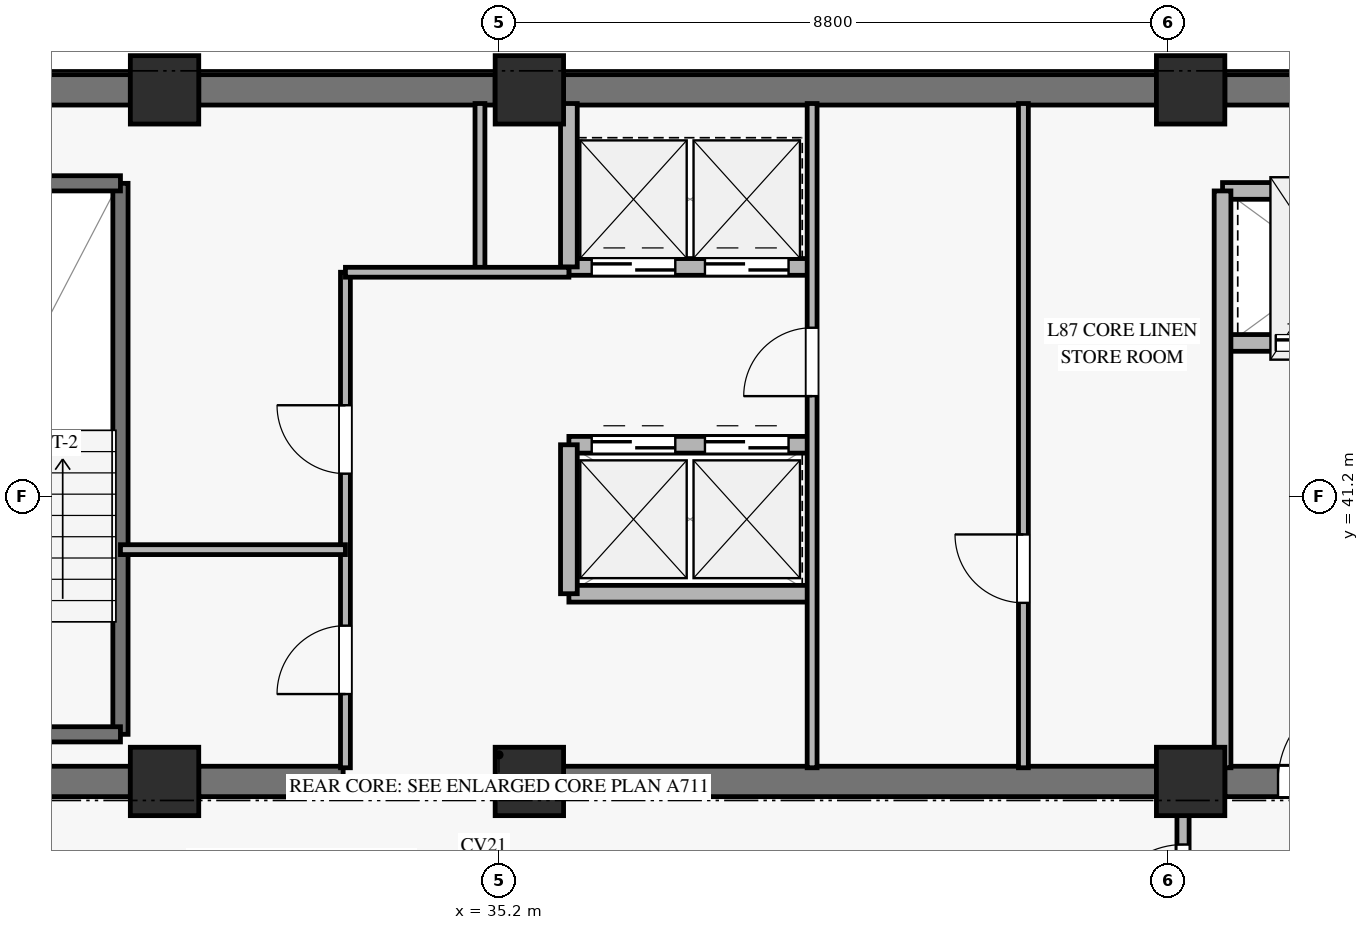
"""IFC4 building model, lengths in metres.
Left out: names, types, materials, properties, quantities, classifications, styles, units other than length and angle.
Written with IfcOpenShell. Run it as: python <this file> out.ifc"""

import sys

from ifc_helpers import new_model, si_unit, direction, frame, frame_2d, origin, origin_2d, place, context, subcontext, project, spatial, rectangle, extrude, source, transform, mapped, element, fill, save


model = new_model("IFC4")
c1 = context("Model", 3, precision=1e-05, world=origin(), true_north=direction((0.0, 1.0)))
c2 = subcontext(c1, "Body", "Model", "MODEL_VIEW")
j1 = project(units=[si_unit("LENGTHUNIT", "METRE"), si_unit("PLANEANGLEUNIT", "RADIAN")], contexts=[c1])
p1 = place(None, origin())
s1 = spatial("IfcSite", under=j1, at=p1, CompositionType="ELEMENT")
p2 = place(p1, origin())
s2 = spatial("IfcBuilding", under=s1, at=p2, CompositionType="ELEMENT")
p3 = place(p2, frame((0.0, 0.0, 335.7)))
s3 = spatial("IfcBuildingStorey", under=s2, at=p3, CompositionType="ELEMENT", Elevation=335.7)
m1 = source(origin(), c2, "Body", "SweptSolid", [
    extrude(rectangle(XDim=0.9, YDim=0.9, at=origin_2d()), origin(), (0.0, 0.0, 1.0), 3.185),
])
for number, where, z_axis, x_axis in (
    (1, (30.8, 37.45, 0.0), (0.0, 0.0, 1.0), (1.0, 0.0, 0.0)),
    (2, (30.8, 46.55, 0.0), (0.0, 0.0, 1.0), (1.0, 0.0, 0.0)),
    (3, (35.6, 37.45, 0.0), (0.0, 0.0, 1.0), (1.0, 0.0, 0.0)),
    (4, (35.6, 46.55, 0.0), (0.0, 0.0, 1.0), (1.0, 0.0, 0.0)),
    (5, (44.3, 37.45, 0.0), (0.0, 0.0, 1.0), (1.0, 0.0, 0.0)),
    (6, (44.3, 46.55, 0.0), (0.0, 0.0, 1.0), (1.0, 0.0, 0.0)),
):
    element("IfcColumn", number, at=place(p3, frame(where, z_axis=z_axis, x_axis=x_axis)), inside=s3, PredefinedType="PILASTER", context=c2, shape_type="MappedRepresentation", body=[
        mapped(m1, transform((0.0, 0.0, 0.0), x_axis=(1.0, 0.0, 0.0), y_axis=(0.0, 1.0, 0.0), z_axis=(0.0, 0.0, 1.0), scale=1.0)),
    ])
p4 = place(p3, frame((20.3, 46.55, 0.0), z_axis=(0.0, 0.0, 1.0), x_axis=(1.0, 0.0, 0.0)))
e7 = element("IfcWall", 7, at=p4, inside=s3, PredefinedType="SHEAR", context=c2, shape_type="SweptSolid", body=[
    extrude(rectangle(XDim=10.05, YDim=0.4, at=frame_2d((5.025, 0.0))), origin(), (0.0, 0.0, 1.0), 3.185),
])
p5 = place(p3, frame((31.25, 46.55, 0.0), z_axis=(0.0, 0.0, 1.0), x_axis=(1.0, 0.0, 0.0)))
e8 = element("IfcWall", 8, at=p5, inside=s3, PredefinedType="SHEAR", context=c2, shape_type="SweptSolid", body=[
    extrude(rectangle(XDim=3.9, YDim=0.4, at=frame_2d((1.95, 0.0))), origin(), (0.0, 0.0, 1.0), 3.185),
])
p6 = place(p3, frame((36.05, 46.55, 0.0), z_axis=(0.0, 0.0, 1.0), x_axis=(1.0, 0.0, 0.0)))
e9 = element("IfcWall", 9, at=p6, inside=s3, PredefinedType="SHEAR", context=c2, shape_type="SweptSolid", body=[
    extrude(rectangle(XDim=7.8, YDim=0.4, at=frame_2d((3.9, 0.0))), origin(), (0.0, 0.0, 1.0), 3.185),
])
p7 = place(p3, frame((44.75, 46.55, 0.0), z_axis=(0.0, 0.0, 1.0), x_axis=(1.0, 0.0, 0.0)))
e10 = element("IfcWall", 10, at=p7, inside=s3, PredefinedType="SHEAR", context=c2, shape_type="SweptSolid", body=[
    extrude(rectangle(XDim=5.35, YDim=0.4, at=frame_2d((2.675, 0.0))), origin(), (0.0, 0.0, 1.0), 3.185),
])
p8 = place(p3, frame((20.3, 37.45, 0.0), z_axis=(0.0, 0.0, 1.0), x_axis=(1.0, 0.0, 0.0)))
e11 = element("IfcWall", 11, at=p8, inside=s3, PredefinedType="SHEAR", context=c2, shape_type="SweptSolid", body=[
    extrude(rectangle(XDim=10.05, YDim=0.4, at=frame_2d((5.025, 0.0))), origin(), (0.0, 0.0, 1.0), 3.185),
])
p9 = place(p8, frame((4.25, 0.0, 0.0)))
e12 = element("IfcOpeningElement", 12, at=p9, cuts=e11, PredefinedType="OPENING", context=c2, shape_type="SweptSolid", body=[
    extrude(rectangle(XDim=1.2, YDim=2.15, at=frame_2d((0.6, 1.075))), frame((0.0, 0.21, 0.0), z_axis=(0.0, -1.0, 0.0), x_axis=(1.0, 0.0, 0.0)), (0.0, 0.0, 1.0), 0.42),
])
p10 = place(p3, frame((31.25, 37.45, 0.0), z_axis=(0.0, 0.0, 1.0), x_axis=(1.0, 0.0, 0.0)))
e13 = element("IfcWall", 13, at=p10, inside=s3, PredefinedType="SHEAR", context=c2, shape_type="SweptSolid", body=[
    extrude(rectangle(XDim=1.9, YDim=0.4, at=frame_2d((0.95, 0.0))), origin(), (0.0, 0.0, 1.0), 3.185),
])
p11 = place(p3, frame((36.05, 37.45, 0.0), z_axis=(0.0, 0.0, 1.0), x_axis=(1.0, 0.0, 0.0)))
e14 = element("IfcWall", 14, at=p11, inside=s3, PredefinedType="SHEAR", context=c2, shape_type="SweptSolid", body=[
    extrude(rectangle(XDim=7.8, YDim=0.4, at=frame_2d((3.9, 0.0))), origin(), (0.0, 0.0, 1.0), 3.185),
])
p12 = place(p3, frame((44.75, 37.45, 0.0), z_axis=(0.0, 0.0, 1.0), x_axis=(1.0, 0.0, 0.0)))
e15 = element("IfcWall", 15, at=p12, inside=s3, PredefinedType="SHEAR", context=c2, shape_type="SweptSolid", body=[
    extrude(rectangle(XDim=5.35, YDim=0.4, at=frame_2d((2.675, 0.0))), origin(), (0.0, 0.0, 1.0), 3.185),
])
p13 = place(p12, frame((0.7, 0.0, 0.0)))
e16 = element("IfcOpeningElement", 16, at=p13, cuts=e15, PredefinedType="OPENING", context=c2, shape_type="SweptSolid", body=[
    extrude(rectangle(XDim=1.2, YDim=2.15, at=frame_2d((0.6, 1.075))), frame((0.0, 0.21, 0.0), z_axis=(0.0, -1.0, 0.0), x_axis=(1.0, 0.0, 0.0)), (0.0, 0.0, 1.0), 0.42),
])
p14 = place(p3, frame((30.22, 38.07, 0.0), z_axis=(0.0, 0.0, 1.0), x_axis=(0.0, 1.0, 0.0)))
e17 = element("IfcWall", 17, at=p14, inside=s3, PredefinedType="SOLIDWALL", context=c2, shape_type="SweptSolid", body=[
    extrude(rectangle(XDim=7.25, YDim=0.2, at=frame_2d((3.625, 0.0))), origin(), (0.0, 0.0, 1.0), 3.4),
])
for number, where, z_axis, x_axis in (
    (18, (27.14, 45.32, 0.0), (0.0, 0.0, 1.0), (1.0, 0.0, 0.0)),
    (19, (27.14, 38.07, 0.0), (0.0, 0.0, 1.0), (1.0, 0.0, 0.0)),
):
    element("IfcWall", number, at=place(p3, frame(where, z_axis=z_axis, x_axis=x_axis)), inside=s3, PredefinedType="SOLIDWALL", context=c2, shape_type="SweptSolid", body=[
        extrude(rectangle(XDim=3.08, YDim=0.2, at=frame_2d((1.54, 0.0))), origin(), (0.0, 0.0, 1.0), 3.4),
    ])
p15 = place(p3, frame((44.72, 43.22, 0.0), z_axis=(0.0, 0.0, 1.0), x_axis=(1.0, 0.0, 0.0)))
e20 = element("IfcWall", 20, at=p15, inside=s3, PredefinedType="SOLIDWALL", context=c2, shape_type="SweptSolid", body=[
    extrude(rectangle(XDim=2.72, YDim=0.22, at=frame_2d((1.36, 0.0))), origin(), (0.0, 0.0, 1.0), 3.185),
])
p16 = place(p15, frame((0.7, 0.0, 0.0)))
e21 = element("IfcOpeningElement", 21, at=p16, cuts=e20, PredefinedType="OPENING", context=c2, shape_type="SweptSolid", body=[
    extrude(rectangle(XDim=1.1, YDim=2.2, at=frame_2d((0.55, 1.1))), frame((0.0, 0.12, 0.0), z_axis=(0.0, -1.0, 0.0), x_axis=(1.0, 0.0, 0.0)), (0.0, 0.0, 1.0), 0.24),
])
p17 = place(p3, frame((44.72, 45.22, 0.0), z_axis=(0.0, 0.0, 1.0), x_axis=(1.0, 0.0, 0.0)))
e22 = element("IfcWall", 22, at=p17, inside=s3, PredefinedType="SOLIDWALL", context=c2, shape_type="SweptSolid", body=[
    extrude(rectangle(XDim=2.72, YDim=0.22, at=frame_2d((1.36, 0.0))), origin(), (0.0, 0.0, 1.0), 3.185),
])
p18 = place(p3, frame((44.72, 37.63, 0.0), z_axis=(0.0, 0.0, 1.0), x_axis=(0.0, 1.0, 0.0)))
e23 = element("IfcWall", 23, at=p18, inside=s3, PredefinedType="SOLIDWALL", context=c2, shape_type="SweptSolid", body=[
    extrude(rectangle(XDim=7.59, YDim=0.22, at=frame_2d((3.795, 0.0))), origin(), (0.0, 0.0, 1.0), 3.185),
])
p19 = place(p3, frame((36.12, 44.22, 0.0), z_axis=(0.0, 0.0, 1.0), x_axis=(1.0, 0.0, 0.0)))
e24 = element("IfcWall", 24, at=p19, inside=s3, PredefinedType="SOLIDWALL", context=c2, shape_type="SweptSolid", body=[
    extrude(rectangle(XDim=3.2, YDim=0.22, at=frame_2d((1.6, 0.0))), origin(), (0.0, 0.0, 1.0), 3.185),
])
p20 = place(p19, frame((0.3, 0.0, 0.0)))
e25 = element("IfcOpeningElement", 25, at=p20, cuts=e24, PredefinedType="OPENING", context=c2, shape_type="SweptSolid", body=[
    extrude(rectangle(XDim=1.1, YDim=2.2, at=frame_2d((0.55, 1.1))), frame((0.0, 0.12, 0.0), z_axis=(0.0, -1.0, 0.0), x_axis=(1.0, 0.0, 0.0)), (0.0, 0.0, 1.0), 0.24),
])
p21 = place(p19, frame((1.79, 0.0, 0.0)))
e26 = element("IfcOpeningElement", 26, at=p21, cuts=e24, PredefinedType="OPENING", context=c2, shape_type="SweptSolid", body=[
    extrude(rectangle(XDim=1.1, YDim=2.2, at=frame_2d((0.55, 1.1))), frame((0.0, 0.12, 0.0), z_axis=(0.0, -1.0, 0.0), x_axis=(1.0, 0.0, 0.0)), (0.0, 0.0, 1.0), 0.24),
])
p22 = place(p3, frame((36.12, 41.88, 0.0), z_axis=(0.0, 0.0, 1.0), x_axis=(1.0, 0.0, 0.0)))
e27 = element("IfcWall", 27, at=p22, inside=s3, PredefinedType="SOLIDWALL", context=c2, shape_type="SweptSolid", body=[
    extrude(rectangle(XDim=3.2, YDim=0.22, at=frame_2d((1.6, 0.0))), origin(), (0.0, 0.0, 1.0), 3.185),
])
p23 = place(p22, frame((0.3, 0.0, 0.0)))
e28 = element("IfcOpeningElement", 28, at=p23, cuts=e27, PredefinedType="OPENING", context=c2, shape_type="SweptSolid", body=[
    extrude(rectangle(XDim=1.1, YDim=2.2, at=frame_2d((0.55, 1.1))), frame((0.0, 0.12, 0.0), z_axis=(0.0, -1.0, 0.0), x_axis=(1.0, 0.0, 0.0)), (0.0, 0.0, 1.0), 0.24),
])
p24 = place(p22, frame((1.79, 0.0, 0.0)))
e29 = element("IfcOpeningElement", 29, at=p24, cuts=e27, PredefinedType="OPENING", context=c2, shape_type="SweptSolid", body=[
    extrude(rectangle(XDim=1.1, YDim=2.2, at=frame_2d((0.55, 1.1))), frame((0.0, 0.12, 0.0), z_axis=(0.0, -1.0, 0.0), x_axis=(1.0, 0.0, 0.0)), (0.0, 0.0, 1.0), 0.24),
])
p25 = place(p3, frame((36.12, 39.92, 0.0), z_axis=(0.0, 0.0, 1.0), x_axis=(1.0, 0.0, 0.0)))
e30 = element("IfcWall", 30, at=p25, inside=s3, PredefinedType="SOLIDWALL", context=c2, shape_type="SweptSolid", body=[
    extrude(rectangle(XDim=3.2, YDim=0.22, at=frame_2d((1.6, 0.0))), origin(), (0.0, 0.0, 1.0), 3.185),
])
p26 = place(p3, frame((36.12, 39.92, 0.0), z_axis=(0.0, 0.0, 1.0), x_axis=(0.0, 1.0, 0.0)))
e31 = element("IfcWall", 31, at=p26, inside=s3, PredefinedType="SOLIDWALL", context=c2, shape_type="SweptSolid", body=[
    extrude(rectangle(XDim=1.96, YDim=0.22, at=frame_2d((0.98, 0.0))), origin(), (0.0, 0.0, 1.0), 3.185),
])
p27 = place(p3, frame((36.12, 44.22, 0.0), z_axis=(0.0, 0.0, 1.0), x_axis=(0.0, 1.0, 0.0)))
e32 = element("IfcWall", 32, at=p27, inside=s3, PredefinedType="SOLIDWALL", context=c2, shape_type="SweptSolid", body=[
    extrude(rectangle(XDim=2.15, YDim=0.22, at=frame_2d((1.075, 0.0))), origin(), (0.0, 0.0, 1.0), 3.185),
])
p28 = place(p3, frame((33.18, 37.63, 0.0), z_axis=(0.0, 0.0, 1.0), x_axis=(0.0, 1.0, 0.0)))
e33 = element("IfcWall", 33, at=p28, inside=s3, PredefinedType="PARTITIONING", context=c2, shape_type="SweptSolid", body=[
    extrude(rectangle(XDim=6.52, YDim=0.13, at=frame_2d((3.26, 0.0))), origin(), (0.0, 0.0, 1.0), 2.27),
])
p29 = place(p28, frame((0.97, 0.0, 0.0)))
e34 = element("IfcOpeningElement", 34, at=p29, cuts=e33, PredefinedType="OPENING", context=c2, shape_type="SweptSolid", body=[
    extrude(rectangle(XDim=0.9, YDim=2.1, at=frame_2d((0.45, 1.05))), frame((0.0, 0.075, 0.0), z_axis=(0.0, -1.0, 0.0), x_axis=(1.0, 0.0, 0.0)), (0.0, 0.0, 1.0), 0.15),
])
p30 = place(p28, frame((3.87, 0.0, 0.0)))
e35 = element("IfcOpeningElement", 35, at=p30, cuts=e33, PredefinedType="OPENING", context=c2, shape_type="SweptSolid", body=[
    extrude(rectangle(XDim=0.9, YDim=2.1, at=frame_2d((0.45, 1.05))), frame((0.0, 0.075, 0.0), z_axis=(0.0, -1.0, 0.0), x_axis=(1.0, 0.0, 0.0)), (0.0, 0.0, 1.0), 0.15),
])
p31 = place(p3, frame((34.95, 44.15, 0.0), z_axis=(0.0, 0.0, 1.0), x_axis=(0.0, 1.0, 0.0)))
e36 = element("IfcWall", 36, at=p31, inside=s3, PredefinedType="PARTITIONING", context=c2, shape_type="SweptSolid", body=[
    extrude(rectangle(XDim=2.22, YDim=0.13, at=frame_2d((1.11, 0.0))), origin(), (0.0, 0.0, 1.0), 3.185),
])
p32 = place(p3, frame((33.18, 44.15, 0.0), z_axis=(0.0, 0.0, 1.0), x_axis=(1.0, 0.0, 0.0)))
e37 = element("IfcWall", 37, at=p32, inside=s3, PredefinedType="PARTITIONING", context=c2, shape_type="SweptSolid", body=[
    extrude(rectangle(XDim=2.94, YDim=0.13, at=frame_2d((1.47, 0.0))), origin(), (0.0, 0.0, 1.0), 2.47),
])
p33 = place(p3, frame((39.32, 37.63, 0.0), z_axis=(0.0, 0.0, 1.0), x_axis=(0.0, 1.0, 0.0)))
e38 = element("IfcWall", 38, at=p33, inside=s3, PredefinedType="PARTITIONING", context=c2, shape_type="SweptSolid", body=[
    extrude(rectangle(XDim=8.74, YDim=0.13, at=frame_2d((4.37, 0.0))), origin(), (0.0, 0.0, 1.0), 3.185),
])
p34 = place(p33, frame((4.89, 0.0, 0.0)))
e39 = element("IfcOpeningElement", 39, at=p34, cuts=e38, PredefinedType="OPENING", context=c2, shape_type="SweptSolid", body=[
    extrude(rectangle(XDim=0.9, YDim=2.1, at=frame_2d((0.45, 1.05))), frame((0.0, 0.075, 0.0), z_axis=(0.0, -1.0, 0.0), x_axis=(1.0, 0.0, 0.0)), (0.0, 0.0, 1.0), 0.15),
])
p35 = place(p3, frame((30.22, 40.5, 0.0), z_axis=(0.0, 0.0, 1.0), x_axis=(1.0, 0.0, 0.0)))
e40 = element("IfcWall", 40, at=p35, inside=s3, PredefinedType="PARTITIONING", context=c2, shape_type="SweptSolid", body=[
    extrude(rectangle(XDim=2.96, YDim=0.13, at=frame_2d((1.48, 0.0))), origin(), (0.0, 0.0, 1.0), 2.47),
])
p36 = place(p3, frame((42.1, 37.63, 0.0), z_axis=(0.0, 0.0, 1.0), x_axis=(0.0, 1.0, 0.0)))
e41 = element("IfcWall", 41, at=p36, inside=s3, PredefinedType="PARTITIONING", context=c2, shape_type="SweptSolid", body=[
    extrude(rectangle(XDim=8.74, YDim=0.13, at=frame_2d((4.37, 0.0))), origin(), (0.0, 0.0, 1.0), 3.185),
])
p37 = place(p36, frame((2.17, 0.0, 0.0)))
e42 = element("IfcOpeningElement", 42, at=p37, cuts=e41, PredefinedType="OPENING", context=c2, shape_type="SweptSolid", body=[
    extrude(rectangle(XDim=0.9, YDim=2.1, at=frame_2d((0.45, 1.05))), frame((0.0, 0.075, 0.0), z_axis=(0.0, -1.0, 0.0), x_axis=(1.0, 0.0, 0.0)), (0.0, 0.0, 1.0), 0.15),
])
p38 = place(p3, frame((44.2, 22.568, 0.0), z_axis=(0.0, 0.0, 1.0), x_axis=(0.0, 1.0, 0.0)))
e43 = element("IfcWall", 43, at=p38, inside=s3, PredefinedType="PARTITIONING", context=c2, shape_type="SweptSolid", body=[
    extrude(rectangle(XDim=14.882, YDim=0.16, at=frame_2d((7.441, 0.0))), origin(), (0.0, 0.0, 1.0), 2.47),
])
p39 = place(p38, frame((13.002, 0.0, 0.0)))
e44 = element("IfcOpeningElement", 44, at=p39, cuts=e43, PredefinedType="OPENING", context=c2, shape_type="SweptSolid", body=[
    extrude(rectangle(XDim=1.05, YDim=2.15, at=frame_2d((0.525, 1.075))), frame((0.0, 0.09, 0.0), z_axis=(0.0, -1.0, 0.0), x_axis=(1.0, 0.0, 0.0)), (0.0, 0.0, 1.0), 0.18),
])
m2 = source(origin(), c2, "Body", "SweptSolid", [
    extrude(rectangle(XDim=1.1, YDim=2.2, at=frame_2d((0.55, 1.1))), frame((0.0, 0.025, 0.0), z_axis=(0.0, -1.0, 0.0), x_axis=(1.0, 0.0, 0.0)), (0.0, 0.0, 1.0), 0.05),
])
p40 = place(p16, origin())
e45 = element("IfcDoor", 45, at=p40, inside=s3, OperationType="SLIDING_TO_LEFT", PredefinedType="DOOR", context=c2, shape_type="MappedRepresentation", body=[
    mapped(m2, transform((0.0, 0.0, 0.0), x_axis=(1.0, 0.0, 0.0), y_axis=(0.0, 1.0, 0.0), z_axis=(0.0, 0.0, 1.0), scale=1.0)),
])
fill(e21, e45)
m3 = source(origin(), c2, "Body", "SweptSolid", [
    extrude(rectangle(XDim=1.2, YDim=2.15, at=frame_2d((0.6, 1.075))), frame((0.0, 0.025, 0.0), z_axis=(0.0, -1.0, 0.0), x_axis=(1.0, 0.0, 0.0)), (0.0, 0.0, 1.0), 0.05),
])
p41 = place(p13, origin())
e46 = element("IfcDoor", 46, at=p41, inside=s3, OperationType="SINGLE_SWING_RIGHT", PredefinedType="DOOR", context=c2, shape_type="MappedRepresentation", body=[
    mapped(m3, transform((0.0, 0.0, 0.0), x_axis=(1.0, 0.0, 0.0), y_axis=(0.0, 1.0, 0.0), z_axis=(0.0, 0.0, 1.0), scale=1.0)),
])
fill(e16, e46)
p42 = place(p20, origin())
e47 = element("IfcDoor", 47, at=p42, inside=s3, OperationType="SLIDING_TO_LEFT", PredefinedType="DOOR", context=c2, shape_type="MappedRepresentation", body=[
    mapped(m2, transform((0.0, 0.0, 0.0), x_axis=(1.0, 0.0, 0.0), y_axis=(0.0, 1.0, 0.0), z_axis=(0.0, 0.0, 1.0), scale=1.0)),
])
fill(e25, e47)
p43 = place(p21, origin())
e48 = element("IfcDoor", 48, at=p43, inside=s3, OperationType="SLIDING_TO_LEFT", PredefinedType="DOOR", context=c2, shape_type="MappedRepresentation", body=[
    mapped(m2, transform((0.0, 0.0, 0.0), x_axis=(1.0, 0.0, 0.0), y_axis=(0.0, 1.0, 0.0), z_axis=(0.0, 0.0, 1.0), scale=1.0)),
])
fill(e26, e48)
p44 = place(p23, origin())
e49 = element("IfcDoor", 49, at=p44, inside=s3, OperationType="SLIDING_TO_LEFT", PredefinedType="DOOR", context=c2, shape_type="MappedRepresentation", body=[
    mapped(m2, transform((0.0, 0.0, 0.0), x_axis=(1.0, 0.0, 0.0), y_axis=(0.0, 1.0, 0.0), z_axis=(0.0, 0.0, 1.0), scale=1.0)),
])
fill(e28, e49)
p45 = place(p24, origin())
e50 = element("IfcDoor", 50, at=p45, inside=s3, OperationType="SLIDING_TO_LEFT", PredefinedType="DOOR", context=c2, shape_type="MappedRepresentation", body=[
    mapped(m2, transform((0.0, 0.0, 0.0), x_axis=(1.0, 0.0, 0.0), y_axis=(0.0, 1.0, 0.0), z_axis=(0.0, 0.0, 1.0), scale=1.0)),
])
fill(e29, e50)
m4 = source(origin(), c2, "Body", "SweptSolid", [
    extrude(rectangle(XDim=0.9, YDim=2.1, at=frame_2d((0.45, 1.05))), frame((0.0, 0.025, 0.0), z_axis=(0.0, -1.0, 0.0), x_axis=(1.0, 0.0, 0.0)), (0.0, 0.0, 1.0), 0.05),
])
p46 = place(p29, origin())
e51 = element("IfcDoor", 51, at=p46, inside=s3, OperationType="SINGLE_SWING_LEFT", PredefinedType="DOOR", context=c2, shape_type="MappedRepresentation", body=[
    mapped(m4, transform((0.0, 0.0, 0.0), x_axis=(1.0, 0.0, 0.0), y_axis=(0.0, 1.0, 0.0), z_axis=(0.0, 0.0, 1.0), scale=1.0)),
])
fill(e34, e51)
p47 = place(p30, origin())
e52 = element("IfcDoor", 52, at=p47, inside=s3, OperationType="SINGLE_SWING_RIGHT", PredefinedType="DOOR", context=c2, shape_type="MappedRepresentation", body=[
    mapped(m4, transform((0.0, 0.0, 0.0), x_axis=(1.0, 0.0, 0.0), y_axis=(0.0, 1.0, 0.0), z_axis=(0.0, 0.0, 1.0), scale=1.0)),
])
fill(e35, e52)
p48 = place(p34, origin())
e53 = element("IfcDoor", 53, at=p48, inside=s3, OperationType="SINGLE_SWING_LEFT", PredefinedType="DOOR", context=c2, shape_type="MappedRepresentation", body=[
    mapped(m4, transform((0.0, 0.0, 0.0), x_axis=(1.0, 0.0, 0.0), y_axis=(0.0, 1.0, 0.0), z_axis=(0.0, 0.0, 1.0), scale=1.0)),
])
fill(e39, e53)
p49 = place(p37, origin())
e54 = element("IfcDoor", 54, at=p49, inside=s3, OperationType="SINGLE_SWING_RIGHT", PredefinedType="DOOR", context=c2, shape_type="MappedRepresentation", body=[
    mapped(m4, transform((0.0, 0.0, 0.0), x_axis=(1.0, 0.0, 0.0), y_axis=(0.0, 1.0, 0.0), z_axis=(0.0, 0.0, 1.0), scale=1.0)),
])
fill(e42, e54)
m5 = source(origin(), c2, "Body", "SweptSolid", [
    extrude(rectangle(XDim=1.05, YDim=2.15, at=frame_2d((0.525, 1.075))), frame((0.0, 0.025, 0.0), z_axis=(0.0, -1.0, 0.0), x_axis=(1.0, 0.0, 0.0)), (0.0, 0.0, 1.0), 0.05),
])
p50 = place(p39, origin())
e55 = element("IfcDoor", 55, at=p50, inside=s3, OperationType="SINGLE_SWING_LEFT", PredefinedType="DOOR", context=c2, shape_type="MappedRepresentation", body=[
    mapped(m5, transform((0.0, 0.0, 0.0), x_axis=(1.0, 0.0, 0.0), y_axis=(0.0, 1.0, 0.0), z_axis=(0.0, 0.0, 1.0), scale=1.0)),
])
fill(e44, e55)
save(model, sys.argv[1])
